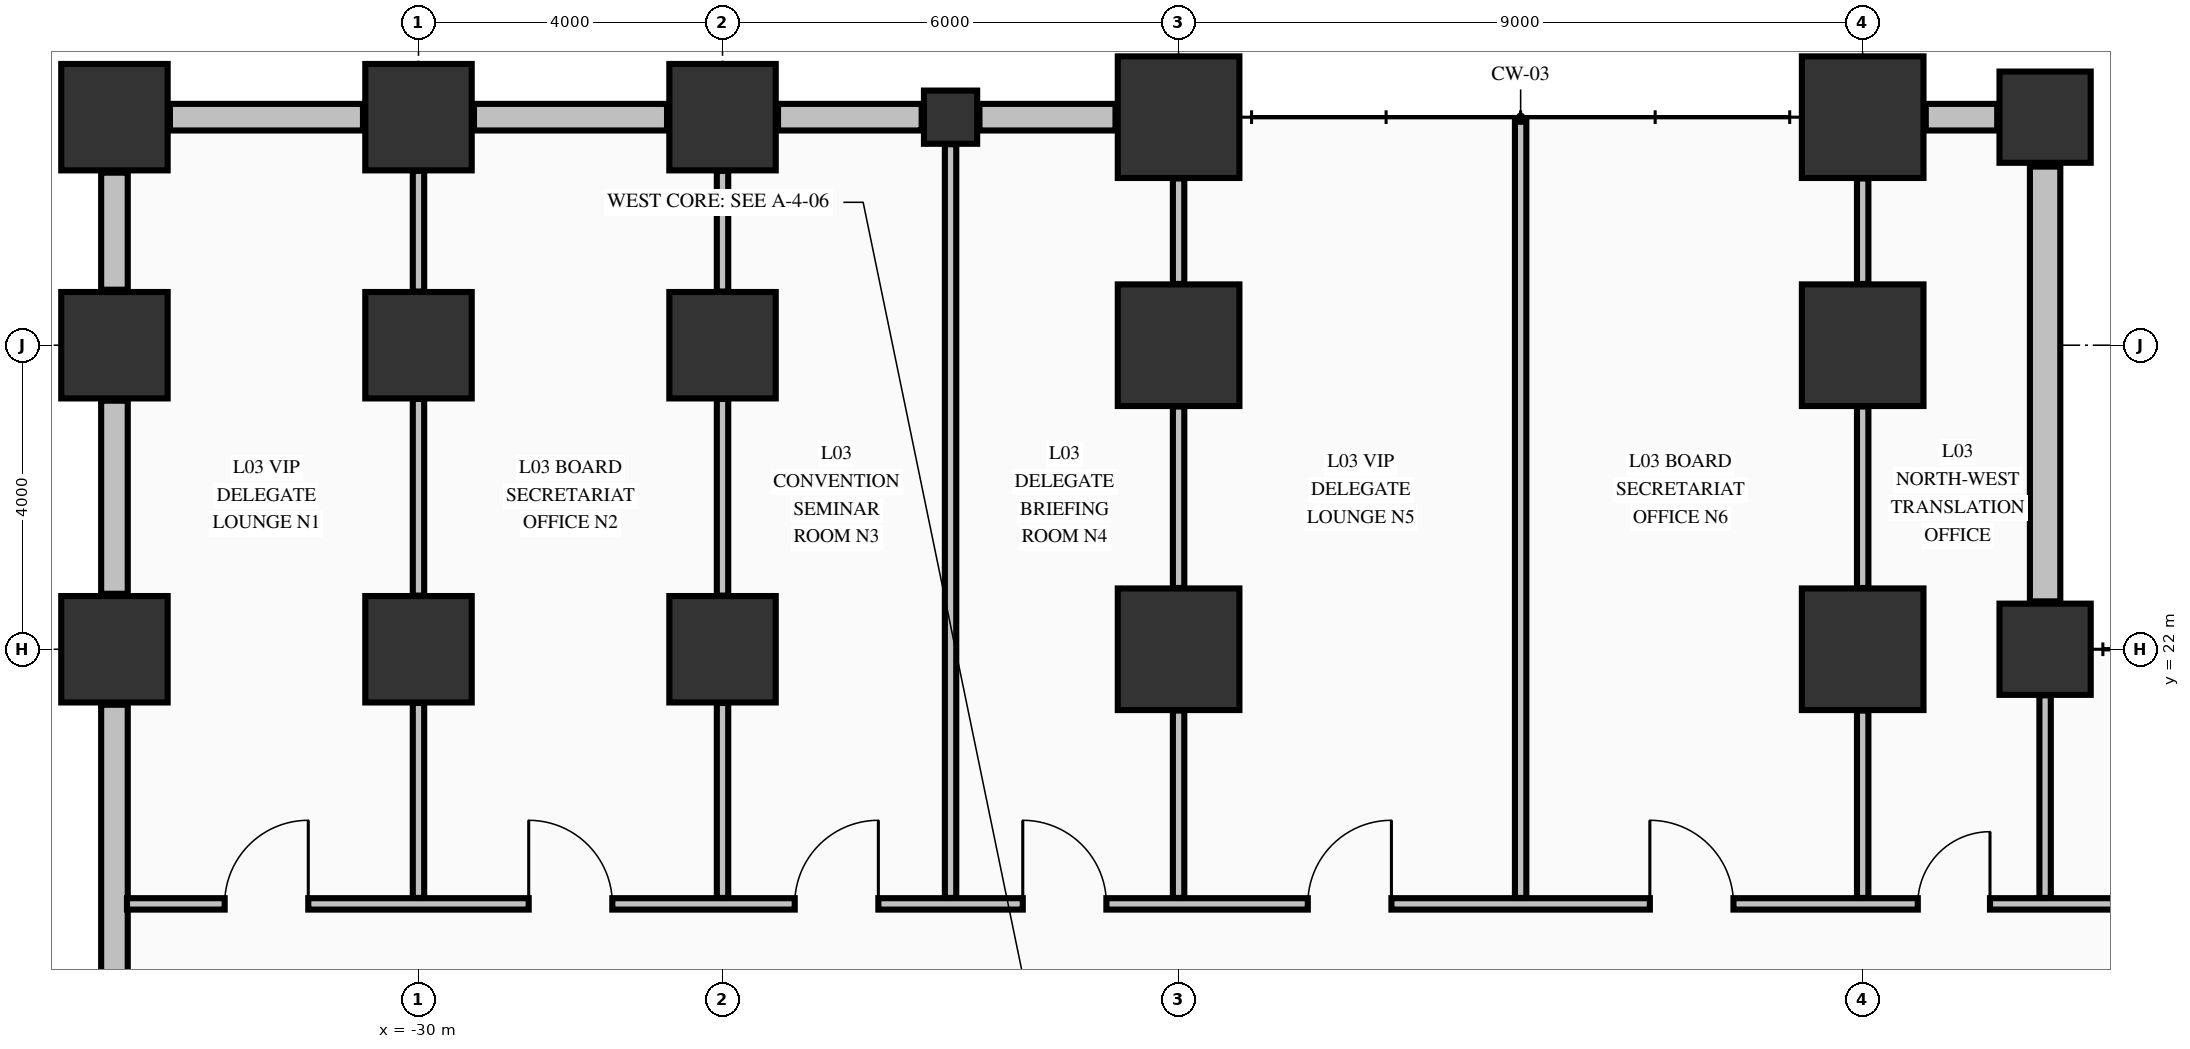
"""IFC4 building model, lengths in metres.
Left out: names, types, materials, properties, quantities, classifications, styles, units other than length and angle.
Written with IfcOpenShell. Run it as: python <this file> out.ifc"""

import sys

from ifc_helpers import new_model, si_unit, direction, frame, frame_2d, origin, origin_2d, place, context, subcontext, project, spatial, rectangle, extrude, element, fill, save


model = new_model("IFC4")
c1 = context("Model", 3, precision=1e-05, world=origin(), true_north=direction((0.0, 1.0)))
c2 = subcontext(c1, "Body", "Model", "MODEL_VIEW")
j1 = project(units=[si_unit("LENGTHUNIT", "METRE"), si_unit("PLANEANGLEUNIT", "RADIAN")], contexts=[c1])
p1 = place(None, origin())
s1 = spatial("IfcSite", under=j1, at=p1, CompositionType="ELEMENT")
p2 = place(p1, origin())
s2 = spatial("IfcBuilding", under=s1, at=p2, CompositionType="ELEMENT")
p3 = place(p2, frame((0.0, 0.0, 16.32)))
s3 = spatial("IfcBuildingStorey", under=s2, at=p3, CompositionType="ELEMENT", Elevation=16.32)
for number, where, z_axis, x_axis in (
    (1, (-34.0, 22.0, 0.0), (0.0, 0.0, 1.0), (1.0, 0.0, 0.0)),
    (2, (-34.0, 26.0, 0.0), (0.0, 0.0, 1.0), (1.0, 0.0, 0.0)),
    (3, (-34.0, 29.0, 0.0), (0.0, 0.0, 1.0), (1.0, 0.0, 0.0)),
    (4, (-30.0, 22.0, 0.0), (0.0, 0.0, 1.0), (1.0, 0.0, 0.0)),
    (5, (-30.0, 26.0, 0.0), (0.0, 0.0, 1.0), (1.0, 0.0, 0.0)),
    (6, (-30.0, 29.0, 0.0), (0.0, 0.0, 1.0), (1.0, 0.0, 0.0)),
    (7, (-26.0, 22.0, 0.0), (0.0, 0.0, 1.0), (1.0, 0.0, 0.0)),
    (8, (-26.0, 26.0, 0.0), (0.0, 0.0, 1.0), (1.0, 0.0, 0.0)),
    (9, (-26.0, 29.0, 0.0), (0.0, 0.0, 1.0), (1.0, 0.0, 0.0)),
):
    element("IfcColumn", number, at=place(p3, frame(where, z_axis=z_axis, x_axis=x_axis)), inside=s3, PredefinedType="COLUMN", context=c2, shape_type="SweptSolid", body=[
        extrude(rectangle(XDim=1.4, YDim=1.4, at=origin_2d()), origin(), (0.0, 0.0, 1.0), 4.99),
    ])
for number, where, z_axis, x_axis in (
    (10, (-20.0, 22.0, 0.0), (0.0, 0.0, 1.0), (1.0, 0.0, 0.0)),
    (11, (-20.0, 26.0, 0.0), (0.0, 0.0, 1.0), (1.0, 0.0, 0.0)),
    (12, (-20.0, 29.0, 0.0), (0.0, 0.0, 1.0), (1.0, 0.0, 0.0)),
    (13, (-11.0, 22.0, 0.0), (0.0, 0.0, 1.0), (1.0, 0.0, 0.0)),
    (14, (-11.0, 26.0, 0.0), (0.0, 0.0, 1.0), (1.0, 0.0, 0.0)),
    (15, (-11.0, 29.0, 0.0), (0.0, 0.0, 1.0), (1.0, 0.0, 0.0)),
):
    element("IfcColumn", number, at=place(p3, frame(where, z_axis=z_axis, x_axis=x_axis)), inside=s3, PredefinedType="COLUMN", context=c2, shape_type="SweptSolid", body=[
        extrude(rectangle(XDim=1.6, YDim=1.6, at=origin_2d()), origin(), (0.0, 0.0, 1.0), 4.99),
    ])
for number, where, z_axis, x_axis in (
    (16, (-8.6, 22.0, 0.0), (0.0, 0.0, 1.0), (1.0, 0.0, 0.0)),
    (17, (-8.6, 29.0, 0.0), (0.0, 0.0, 1.0), (1.0, 0.0, 0.0)),
):
    element("IfcColumn", number, at=place(p3, frame(where, z_axis=z_axis, x_axis=x_axis)), inside=s3, PredefinedType="COLUMN", context=c2, shape_type="SweptSolid", body=[
        extrude(rectangle(XDim=1.2, YDim=1.2, at=origin_2d()), origin(), (0.0, 0.0, 1.0), 4.99),
    ])
p4 = place(p3, frame((-23.0, 29.0, 0.0), z_axis=(0.0, 0.0, 1.0), x_axis=(1.0, 0.0, 0.0)))
e18 = element("IfcColumn", 18, at=p4, inside=s3, PredefinedType="PILASTER", context=c2, shape_type="SweptSolid", body=[
    extrude(rectangle(XDim=0.7, YDim=0.7, at=origin_2d()), origin(), (0.0, 0.0, 1.0), 4.99),
])
for number, where, z_axis, x_axis in (
    (19, (-30.73, 29.0, 0.0), (0.0, 0.0, 1.0), (-1.0, 0.0, 0.0)),
    (20, (-26.73, 29.0, 0.0), (0.0, 0.0, 1.0), (-1.0, 0.0, 0.0)),
):
    element("IfcWall", number, at=place(p3, frame(where, z_axis=z_axis, x_axis=x_axis)), inside=s3, PredefinedType="STANDARD", context=c2, shape_type="SweptSolid", body=[
        extrude(rectangle(XDim=2.54, YDim=0.35, at=frame_2d((1.27, 0.0))), origin(), (0.0, 0.0, 1.0), 3.332),
    ])
p5 = place(p3, frame((-23.38, 29.0, 0.0), z_axis=(0.0, 0.0, 1.0), x_axis=(-1.0, 0.0, 0.0)))
e21 = element("IfcWall", 21, at=p5, inside=s3, PredefinedType="STANDARD", context=c2, shape_type="SweptSolid", body=[
    extrude(rectangle(XDim=1.89, YDim=0.35, at=frame_2d((0.945, 0.0))), origin(), (0.0, 0.0, 1.0), 3.332),
])
p6 = place(p3, frame((-20.83, 29.0, 0.0), z_axis=(0.0, 0.0, 1.0), x_axis=(-1.0, 0.0, 0.0)))
e22 = element("IfcWall", 22, at=p6, inside=s3, PredefinedType="STANDARD", context=c2, shape_type="SweptSolid", body=[
    extrude(rectangle(XDim=1.79, YDim=0.35, at=frame_2d((0.895, 0.0))), origin(), (0.0, 0.0, 1.0), 3.332),
])
p7 = place(p3, frame((-9.23, 29.0, 0.0), z_axis=(0.0, 0.0, 1.0), x_axis=(-1.0, 0.0, 0.0)))
e23 = element("IfcWall", 23, at=p7, inside=s3, PredefinedType="STANDARD", context=c2, shape_type="SweptSolid", body=[
    extrude(rectangle(XDim=0.94, YDim=0.35, at=frame_2d((0.47, 0.0))), origin(), (0.0, 0.0, 1.0), 3.332),
])
p8 = place(p3, frame((-34.0, 16.73, 0.0), z_axis=(0.0, 0.0, 1.0), x_axis=(0.0, 1.0, 0.0)))
e24 = element("IfcWall", 24, at=p8, inside=s3, PredefinedType="STANDARD", context=c2, shape_type="SweptSolid", body=[
    extrude(rectangle(XDim=4.54, YDim=0.35, at=frame_2d((2.27, 0.0))), origin(), (0.0, 0.0, 1.0), 3.332),
])
p9 = place(p3, frame((-34.0, 22.73, 0.0), z_axis=(0.0, 0.0, 1.0), x_axis=(0.0, 1.0, 0.0)))
e25 = element("IfcWall", 25, at=p9, inside=s3, PredefinedType="STANDARD", context=c2, shape_type="SweptSolid", body=[
    extrude(rectangle(XDim=2.54, YDim=0.35, at=frame_2d((1.27, 0.0))), origin(), (0.0, 0.0, 1.0), 3.332),
])
p10 = place(p3, frame((-34.0, 26.73, 0.0), z_axis=(0.0, 0.0, 1.0), x_axis=(0.0, 1.0, 0.0)))
e26 = element("IfcWall", 26, at=p10, inside=s3, PredefinedType="STANDARD", context=c2, shape_type="SweptSolid", body=[
    extrude(rectangle(XDim=1.54, YDim=0.35, at=frame_2d((0.77, 0.0))), origin(), (0.0, 0.0, 1.0), 3.332),
])
p11 = place(p3, frame((-8.6, 22.63, 0.0), z_axis=(0.0, 0.0, 1.0), x_axis=(0.0, 1.0, 0.0)))
e27 = element("IfcWall", 27, at=p11, inside=s3, PredefinedType="STANDARD", context=c2, shape_type="SweptSolid", body=[
    extrude(rectangle(XDim=5.72, YDim=0.4, at=frame_2d((2.86, 0.0))), origin(), (0.0, 0.0, 1.0), 3.332),
])
p12 = place(p3, frame((-33.835, 18.65, 0.0), z_axis=(0.0, 0.0, 1.0), x_axis=(1.0, 0.0, 0.0)))
e28 = element("IfcWall", 28, at=p12, inside=s3, PredefinedType="PARTITIONING", context=c2, shape_type="SweptSolid", body=[
    extrude(rectangle(XDim=63.685, YDim=0.15, at=frame_2d((31.843, 0.0))), origin(), (0.0, 0.0, 1.0), 4.99),
])
p13 = place(p12, frame((1.285, 0.0, 0.0)))
e29 = element("IfcOpeningElement", 29, at=p13, cuts=e28, PredefinedType="OPENING", context=c2, shape_type="SweptSolid", body=[
    extrude(rectangle(XDim=1.1, YDim=2.15, at=frame_2d((0.55, 1.075))), frame((0.0, 0.085, 0.0), z_axis=(0.0, -1.0, 0.0), x_axis=(1.0, 0.0, 0.0)), (0.0, 0.0, 1.0), 0.17),
])
p14 = place(p12, frame((5.285, 0.0, 0.0)))
e30 = element("IfcOpeningElement", 30, at=p14, cuts=e28, PredefinedType="OPENING", context=c2, shape_type="SweptSolid", body=[
    extrude(rectangle(XDim=1.1, YDim=2.15, at=frame_2d((0.55, 1.075))), frame((0.0, 0.085, 0.0), z_axis=(0.0, -1.0, 0.0), x_axis=(1.0, 0.0, 0.0)), (0.0, 0.0, 1.0), 0.17),
])
p15 = place(p12, frame((8.785, 0.0, 0.0)))
e31 = element("IfcOpeningElement", 31, at=p15, cuts=e28, PredefinedType="OPENING", context=c2, shape_type="SweptSolid", body=[
    extrude(rectangle(XDim=1.1, YDim=2.15, at=frame_2d((0.55, 1.075))), frame((0.0, 0.085, 0.0), z_axis=(0.0, -1.0, 0.0), x_axis=(1.0, 0.0, 0.0)), (0.0, 0.0, 1.0), 0.17),
])
p16 = place(p12, frame((11.785, 0.0, 0.0)))
e32 = element("IfcOpeningElement", 32, at=p16, cuts=e28, PredefinedType="OPENING", context=c2, shape_type="SweptSolid", body=[
    extrude(rectangle(XDim=1.1, YDim=2.15, at=frame_2d((0.55, 1.075))), frame((0.0, 0.085, 0.0), z_axis=(0.0, -1.0, 0.0), x_axis=(1.0, 0.0, 0.0)), (0.0, 0.0, 1.0), 0.17),
])
p17 = place(p12, frame((15.535, 0.0, 0.0)))
e33 = element("IfcOpeningElement", 33, at=p17, cuts=e28, PredefinedType="OPENING", context=c2, shape_type="SweptSolid", body=[
    extrude(rectangle(XDim=1.1, YDim=2.15, at=frame_2d((0.55, 1.075))), frame((0.0, 0.085, 0.0), z_axis=(0.0, -1.0, 0.0), x_axis=(1.0, 0.0, 0.0)), (0.0, 0.0, 1.0), 0.17),
])
p18 = place(p12, frame((20.035, 0.0, 0.0)))
e34 = element("IfcOpeningElement", 34, at=p18, cuts=e28, PredefinedType="OPENING", context=c2, shape_type="SweptSolid", body=[
    extrude(rectangle(XDim=1.1, YDim=2.15, at=frame_2d((0.55, 1.075))), frame((0.0, 0.085, 0.0), z_axis=(0.0, -1.0, 0.0), x_axis=(1.0, 0.0, 0.0)), (0.0, 0.0, 1.0), 0.17),
])
p19 = place(p12, frame((23.56, 0.0, 0.0)))
e35 = element("IfcOpeningElement", 35, at=p19, cuts=e28, PredefinedType="OPENING", context=c2, shape_type="SweptSolid", body=[
    extrude(rectangle(XDim=0.95, YDim=2.15, at=frame_2d((0.475, 1.075))), frame((0.0, 0.085, 0.0), z_axis=(0.0, -1.0, 0.0), x_axis=(1.0, 0.0, 0.0)), (0.0, 0.0, 1.0), 0.17),
])
p20 = place(p12, frame((28.985, 0.0, 0.0)))
e36 = element("IfcOpeningElement", 36, at=p20, cuts=e28, PredefinedType="OPENING", context=c2, shape_type="SweptSolid", body=[
    extrude(rectangle(XDim=1.1, YDim=2.15, at=frame_2d((0.55, 1.075))), frame((0.0, 0.085, 0.0), z_axis=(0.0, -1.0, 0.0), x_axis=(1.0, 0.0, 0.0)), (0.0, 0.0, 1.0), 0.17),
])
p21 = place(p12, frame((37.585, 0.0, 0.0)))
e37 = element("IfcOpeningElement", 37, at=p21, cuts=e28, PredefinedType="OPENING", context=c2, shape_type="SweptSolid", body=[
    extrude(rectangle(XDim=1.1, YDim=2.15, at=frame_2d((0.55, 1.075))), frame((0.0, 0.085, 0.0), z_axis=(0.0, -1.0, 0.0), x_axis=(1.0, 0.0, 0.0)), (0.0, 0.0, 1.0), 0.17),
])
p22 = place(p12, frame((43.16, 0.0, 0.0)))
e38 = element("IfcOpeningElement", 38, at=p22, cuts=e28, PredefinedType="OPENING", context=c2, shape_type="SweptSolid", body=[
    extrude(rectangle(XDim=0.95, YDim=2.15, at=frame_2d((0.475, 1.075))), frame((0.0, 0.085, 0.0), z_axis=(0.0, -1.0, 0.0), x_axis=(1.0, 0.0, 0.0)), (0.0, 0.0, 1.0), 0.17),
])
p23 = place(p12, frame((61.31, 0.0, 0.0)))
e39 = element("IfcOpeningElement", 39, at=p23, cuts=e28, PredefinedType="OPENING", context=c2, shape_type="SweptSolid", body=[
    extrude(rectangle(XDim=0.95, YDim=2.15, at=frame_2d((0.475, 1.075))), frame((0.0, 0.085, 0.0), z_axis=(0.0, -1.0, 0.0), x_axis=(1.0, 0.0, 0.0)), (0.0, 0.0, 1.0), 0.17),
])
p24 = place(p12, frame((47.56, 0.0, 0.0)))
e40 = element("IfcOpeningElement", 40, at=p24, cuts=e28, PredefinedType="OPENING", context=c2, shape_type="SweptSolid", body=[
    extrude(rectangle(XDim=0.95, YDim=2.15, at=frame_2d((0.475, 1.075))), frame((0.0, 0.085, 0.0), z_axis=(0.0, -1.0, 0.0), x_axis=(1.0, 0.0, 0.0)), (0.0, 0.0, 1.0), 0.17),
])
p25 = place(p12, frame((51.31, 0.0, 0.0)))
e41 = element("IfcOpeningElement", 41, at=p25, cuts=e28, PredefinedType="OPENING", context=c2, shape_type="SweptSolid", body=[
    extrude(rectangle(XDim=1.05, YDim=2.15, at=frame_2d((0.525, 1.075))), frame((0.0, 0.085, 0.0), z_axis=(0.0, -1.0, 0.0), x_axis=(1.0, 0.0, 0.0)), (0.0, 0.0, 1.0), 0.17),
])
p26 = place(p12, frame((56.06, 0.0, 0.0)))
e42 = element("IfcOpeningElement", 42, at=p26, cuts=e28, PredefinedType="OPENING", context=c2, shape_type="SweptSolid", body=[
    extrude(rectangle(XDim=0.95, YDim=2.15, at=frame_2d((0.475, 1.075))), frame((0.0, 0.085, 0.0), z_axis=(0.0, -1.0, 0.0), x_axis=(1.0, 0.0, 0.0)), (0.0, 0.0, 1.0), 0.17),
])
p27 = place(p12, frame((58.535, 0.0, 0.0)))
e43 = element("IfcOpeningElement", 43, at=p27, cuts=e28, PredefinedType="OPENING", context=c2, shape_type="SweptSolid", body=[
    extrude(rectangle(XDim=0.9, YDim=2.15, at=frame_2d((0.45, 1.075))), frame((0.0, 0.085, 0.0), z_axis=(0.0, -1.0, 0.0), x_axis=(1.0, 0.0, 0.0)), (0.0, 0.0, 1.0), 0.17),
])
p28 = place(p3, frame((-30.0, 18.728, 0.0), z_axis=(0.0, 0.0, 1.0), x_axis=(0.0, 1.0, 0.0)))
e44 = element("IfcWall", 44, at=p28, inside=s3, PredefinedType="PARTITIONING", context=c2, shape_type="SweptSolid", body=[
    extrude(rectangle(XDim=2.566, YDim=0.15, at=frame_2d((1.283, 0.0))), origin(), (0.0, 0.0, 1.0), 3.332),
])
p29 = place(p3, frame((-30.0, 22.706, 0.0), z_axis=(0.0, 0.0, 1.0), x_axis=(0.0, 1.0, 0.0)))
e45 = element("IfcWall", 45, at=p29, inside=s3, PredefinedType="PARTITIONING", context=c2, shape_type="SweptSolid", body=[
    extrude(rectangle(XDim=2.588, YDim=0.15, at=frame_2d((1.294, 0.0))), origin(), (0.0, 0.0, 1.0), 3.332),
])
p30 = place(p3, frame((-30.0, 26.706, 0.0), z_axis=(0.0, 0.0, 1.0), x_axis=(0.0, 1.0, 0.0)))
e46 = element("IfcWall", 46, at=p30, inside=s3, PredefinedType="PARTITIONING", context=c2, shape_type="SweptSolid", body=[
    extrude(rectangle(XDim=1.588, YDim=0.15, at=frame_2d((0.794, 0.0))), origin(), (0.0, 0.0, 1.0), 3.332),
])
p31 = place(p3, frame((-26.0, 18.728, 0.0), z_axis=(0.0, 0.0, 1.0), x_axis=(0.0, 1.0, 0.0)))
e47 = element("IfcWall", 47, at=p31, inside=s3, PredefinedType="PARTITIONING", context=c2, shape_type="SweptSolid", body=[
    extrude(rectangle(XDim=2.566, YDim=0.15, at=frame_2d((1.283, 0.0))), origin(), (0.0, 0.0, 1.0), 3.332),
])
p32 = place(p3, frame((-26.0, 22.706, 0.0), z_axis=(0.0, 0.0, 1.0), x_axis=(0.0, 1.0, 0.0)))
e48 = element("IfcWall", 48, at=p32, inside=s3, PredefinedType="PARTITIONING", context=c2, shape_type="SweptSolid", body=[
    extrude(rectangle(XDim=2.588, YDim=0.15, at=frame_2d((1.294, 0.0))), origin(), (0.0, 0.0, 1.0), 3.332),
])
p33 = place(p3, frame((-26.0, 26.706, 0.0), z_axis=(0.0, 0.0, 1.0), x_axis=(0.0, 1.0, 0.0)))
e49 = element("IfcWall", 49, at=p33, inside=s3, PredefinedType="PARTITIONING", context=c2, shape_type="SweptSolid", body=[
    extrude(rectangle(XDim=1.588, YDim=0.15, at=frame_2d((0.794, 0.0))), origin(), (0.0, 0.0, 1.0), 3.332),
])
p34 = place(p3, frame((-23.0, 18.728, 0.0), z_axis=(0.0, 0.0, 1.0), x_axis=(0.0, 1.0, 0.0)))
e50 = element("IfcWall", 50, at=p34, inside=s3, PredefinedType="PARTITIONING", context=c2, shape_type="SweptSolid", body=[
    extrude(rectangle(XDim=9.916, YDim=0.15, at=frame_2d((4.958, 0.0))), origin(), (0.0, 0.0, 1.0), 4.99),
])
p35 = place(p3, frame((-20.0, 18.728, 0.0), z_axis=(0.0, 0.0, 1.0), x_axis=(0.0, 1.0, 0.0)))
e51 = element("IfcWall", 51, at=p35, inside=s3, PredefinedType="PARTITIONING", context=c2, shape_type="SweptSolid", body=[
    extrude(rectangle(XDim=2.466, YDim=0.15, at=frame_2d((1.233, 0.0))), origin(), (0.0, 0.0, 1.0), 3.332),
])
p36 = place(p3, frame((-20.0, 22.806, 0.0), z_axis=(0.0, 0.0, 1.0), x_axis=(0.0, 1.0, 0.0)))
e52 = element("IfcWall", 52, at=p36, inside=s3, PredefinedType="PARTITIONING", context=c2, shape_type="SweptSolid", body=[
    extrude(rectangle(XDim=2.388, YDim=0.15, at=frame_2d((1.194, 0.0))), origin(), (0.0, 0.0, 1.0), 3.332),
])
p37 = place(p3, frame((-20.0, 26.806, 0.0), z_axis=(0.0, 0.0, 1.0), x_axis=(0.0, 1.0, 0.0)))
e53 = element("IfcWall", 53, at=p37, inside=s3, PredefinedType="PARTITIONING", context=c2, shape_type="SweptSolid", body=[
    extrude(rectangle(XDim=1.388, YDim=0.15, at=frame_2d((0.694, 0.0))), origin(), (0.0, 0.0, 1.0), 3.332),
])
p38 = place(p3, frame((-15.5, 18.728, 0.0), z_axis=(0.0, 0.0, 1.0), x_axis=(0.0, 1.0, 0.0)))
e54 = element("IfcWall", 54, at=p38, inside=s3, PredefinedType="PARTITIONING", context=c2, shape_type="SweptSolid", body=[
    extrude(rectangle(XDim=10.212, YDim=0.15, at=frame_2d((5.106, 0.0))), origin(), (0.0, 0.0, 1.0), 4.99),
])
p39 = place(p3, frame((-11.0, 18.728, 0.0), z_axis=(0.0, 0.0, 1.0), x_axis=(0.0, 1.0, 0.0)))
e55 = element("IfcWall", 55, at=p39, inside=s3, PredefinedType="PARTITIONING", context=c2, shape_type="SweptSolid", body=[
    extrude(rectangle(XDim=2.466, YDim=0.15, at=frame_2d((1.233, 0.0))), origin(), (0.0, 0.0, 1.0), 3.332),
])
p40 = place(p3, frame((-11.0, 22.806, 0.0), z_axis=(0.0, 0.0, 1.0), x_axis=(0.0, 1.0, 0.0)))
e56 = element("IfcWall", 56, at=p40, inside=s3, PredefinedType="PARTITIONING", context=c2, shape_type="SweptSolid", body=[
    extrude(rectangle(XDim=2.388, YDim=0.15, at=frame_2d((1.194, 0.0))), origin(), (0.0, 0.0, 1.0), 3.332),
])
p41 = place(p3, frame((-11.0, 26.806, 0.0), z_axis=(0.0, 0.0, 1.0), x_axis=(0.0, 1.0, 0.0)))
e57 = element("IfcWall", 57, at=p41, inside=s3, PredefinedType="PARTITIONING", context=c2, shape_type="SweptSolid", body=[
    extrude(rectangle(XDim=1.388, YDim=0.15, at=frame_2d((0.694, 0.0))), origin(), (0.0, 0.0, 1.0), 3.332),
])
p42 = place(p3, frame((-8.6, 18.728, 0.0), z_axis=(0.0, 0.0, 1.0), x_axis=(0.0, 1.0, 0.0)))
e58 = element("IfcWall", 58, at=p42, inside=s3, PredefinedType="PARTITIONING", context=c2, shape_type="SweptSolid", body=[
    extrude(rectangle(XDim=2.666, YDim=0.15, at=frame_2d((1.333, 0.0))), origin(), (0.0, 0.0, 1.0), 3.332),
])
p43 = place(p13, origin())
e59 = element("IfcDoor", 59, at=p43, inside=s3, OperationType="SINGLE_SWING_RIGHT", PredefinedType="DOOR", context=c2, shape_type="SweptSolid", body=[
    extrude(rectangle(XDim=1.1, YDim=2.15, at=frame_2d((0.55, 1.075))), frame((0.0, 0.025, 0.0), z_axis=(0.0, -1.0, 0.0), x_axis=(1.0, 0.0, 0.0)), (0.0, 0.0, 1.0), 0.05),
])
fill(e29, e59)
p44 = place(p14, origin())
e60 = element("IfcDoor", 60, at=p44, inside=s3, OperationType="SINGLE_SWING_LEFT", PredefinedType="DOOR", context=c2, shape_type="SweptSolid", body=[
    extrude(rectangle(XDim=1.1, YDim=2.15, at=frame_2d((0.55, 1.075))), frame((0.0, 0.025, 0.0), z_axis=(0.0, -1.0, 0.0), x_axis=(1.0, 0.0, 0.0)), (0.0, 0.0, 1.0), 0.05),
])
fill(e30, e60)
p45 = place(p15, origin())
e61 = element("IfcDoor", 61, at=p45, inside=s3, OperationType="SINGLE_SWING_RIGHT", PredefinedType="DOOR", context=c2, shape_type="SweptSolid", body=[
    extrude(rectangle(XDim=1.1, YDim=2.15, at=frame_2d((0.55, 1.075))), frame((0.0, 0.025, 0.0), z_axis=(0.0, -1.0, 0.0), x_axis=(1.0, 0.0, 0.0)), (0.0, 0.0, 1.0), 0.05),
])
fill(e31, e61)
p46 = place(p16, origin())
e62 = element("IfcDoor", 62, at=p46, inside=s3, OperationType="SINGLE_SWING_LEFT", PredefinedType="DOOR", context=c2, shape_type="SweptSolid", body=[
    extrude(rectangle(XDim=1.1, YDim=2.15, at=frame_2d((0.55, 1.075))), frame((0.0, 0.025, 0.0), z_axis=(0.0, -1.0, 0.0), x_axis=(1.0, 0.0, 0.0)), (0.0, 0.0, 1.0), 0.05),
])
fill(e32, e62)
p47 = place(p17, origin())
e63 = element("IfcDoor", 63, at=p47, inside=s3, OperationType="SINGLE_SWING_RIGHT", PredefinedType="DOOR", context=c2, shape_type="SweptSolid", body=[
    extrude(rectangle(XDim=1.1, YDim=2.15, at=frame_2d((0.55, 1.075))), frame((0.0, 0.025, 0.0), z_axis=(0.0, -1.0, 0.0), x_axis=(1.0, 0.0, 0.0)), (0.0, 0.0, 1.0), 0.05),
])
fill(e33, e63)
p48 = place(p18, origin())
e64 = element("IfcDoor", 64, at=p48, inside=s3, OperationType="SINGLE_SWING_LEFT", PredefinedType="DOOR", context=c2, shape_type="SweptSolid", body=[
    extrude(rectangle(XDim=1.1, YDim=2.15, at=frame_2d((0.55, 1.075))), frame((0.0, 0.025, 0.0), z_axis=(0.0, -1.0, 0.0), x_axis=(1.0, 0.0, 0.0)), (0.0, 0.0, 1.0), 0.05),
])
fill(e34, e64)
p49 = place(p19, origin())
e65 = element("IfcDoor", 65, at=p49, inside=s3, OperationType="SINGLE_SWING_RIGHT", PredefinedType="DOOR", context=c2, shape_type="SweptSolid", body=[
    extrude(rectangle(XDim=0.95, YDim=2.15, at=frame_2d((0.475, 1.075))), frame((0.0, 0.025, 0.0), z_axis=(0.0, -1.0, 0.0), x_axis=(1.0, 0.0, 0.0)), (0.0, 0.0, 1.0), 0.05),
])
fill(e35, e65)
save(model, sys.argv[1])
